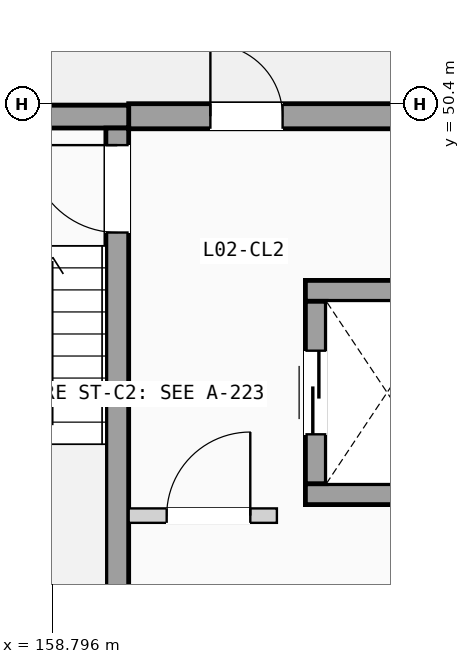
"""IFC4 building model, lengths in metres.
Left out: names, types, materials, properties, quantities, classifications, styles, units other than length and angle.
Written with IfcOpenShell. Run it as: python <this file> out.ifc"""

import sys

from ifc_helpers import new_model, si_unit, direction, frame, frame_2d, origin, place, context, subcontext, project, spatial, rectangle, extrude, element, fill, save


model = new_model("IFC4")
c1 = context("Model", 3, precision=1e-05, world=origin(), true_north=direction((0.0, 1.0)))
c2 = subcontext(c1, "Body", "Model", "MODEL_VIEW")
j1 = project(units=[si_unit("LENGTHUNIT", "METRE"), si_unit("PLANEANGLEUNIT", "RADIAN")], contexts=[c1])
p1 = place(None, origin())
s1 = spatial("IfcSite", under=j1, at=p1, CompositionType="ELEMENT")
p2 = place(p1, origin())
s2 = spatial("IfcBuilding", under=s1, at=p2, CompositionType="ELEMENT")
p3 = place(p2, frame((0.0, 0.0, 8.575)))
s3 = spatial("IfcBuildingStorey", under=s2, at=p3, CompositionType="ELEMENT", Elevation=8.575)
p4 = place(p3, frame((159.8, 50.235, 0.0), z_axis=(0.0, 0.0, 1.0), x_axis=(1.0, 0.0, 0.0)))
e1 = element("IfcWall", 1, at=p4, inside=s3, PredefinedType="SOLIDWALL", context=c2, shape_type="SweptSolid", body=[
    extrude(rectangle(XDim=4.1, YDim=0.33, at=frame_2d((2.05, 0.0))), origin(), (0.0, 0.0, 1.0), 3.24),
])
p5 = place(p4, frame((1.075, 0.0, 0.0)))
e2 = element("IfcOpeningElement", 2, at=p5, cuts=e1, PredefinedType="OPENING", context=c2, shape_type="SweptSolid", body=[
    extrude(rectangle(XDim=0.95, YDim=2.15, at=frame_2d((0.475, 1.075))), frame((0.0, 0.175, 0.0), z_axis=(0.0, -1.0, 0.0), x_axis=(1.0, 0.0, 0.0)), (0.0, 0.0, 1.0), 0.35),
])
p6 = place(p3, frame((156.2, 50.23, 0.0), z_axis=(0.0, 0.0, 1.0), x_axis=(1.0, 0.0, 0.0)))
e3 = element("IfcWall", 3, at=p6, inside=s3, PredefinedType="SHEAR", context=c2, shape_type="SweptSolid", body=[
    extrude(rectangle(XDim=3.6, YDim=0.3, at=frame_2d((1.8, 0.0))), origin(), (0.0, 0.0, 1.0), 3.24),
])
p7 = place(p3, frame((159.65, 43.08, 0.0), z_axis=(0.0, 0.0, 1.0), x_axis=(0.0, 1.0, 0.0)))
e4 = element("IfcWall", 4, at=p7, inside=s3, PredefinedType="SHEAR", context=c2, shape_type="SweptSolid", body=[
    extrude(rectangle(XDim=7.0, YDim=0.3, at=frame_2d((3.5, 0.0))), origin(), (0.0, 0.0, 1.0), 3.24),
])
p8 = place(p7, frame((5.625, 0.0, 0.0)))
e5 = element("IfcOpeningElement", 5, at=p8, cuts=e4, PredefinedType="OPENING", context=c2, shape_type="SweptSolid", body=[
    extrude(rectangle(XDim=1.15, YDim=2.12, at=frame_2d((0.575, 1.06))), frame((0.0, 0.16, 0.0), z_axis=(0.0, -1.0, 0.0), x_axis=(1.0, 0.0, 0.0)), (0.0, 0.0, 1.0), 0.32),
])
for number, where, z_axis, x_axis in (
    (6, (162.125, 45.262, 0.0), (0.0, 0.0, 1.0), (1.0, 0.0, 0.0)),
    (7, (162.125, 47.938, 0.0), (0.0, 0.0, 1.0), (1.0, 0.0, 0.0)),
):
    element("IfcWall", number, at=place(p3, frame(where, z_axis=z_axis, x_axis=x_axis)), inside=s3, PredefinedType="SHEAR", context=c2, shape_type="SweptSolid", body=[
        extrude(rectangle(XDim=2.15, YDim=0.275, at=frame_2d((1.075, 0.0))), origin(), (0.0, 0.0, 1.0), 3.24),
    ])
p9 = place(p3, frame((162.262, 45.4, 0.0), z_axis=(0.0, 0.0, 1.0), x_axis=(0.0, 1.0, 0.0)))
e8 = element("IfcWall", 8, at=p9, inside=s3, PredefinedType="SHEAR", context=c2, shape_type="SweptSolid", body=[
    extrude(rectangle(XDim=2.4, YDim=0.275, at=frame_2d((1.2, 0.0))), origin(), (0.0, 0.0, 1.0), 3.24),
])
p10 = place(p9, frame((0.65, 0.0, 0.0)))
e9 = element("IfcOpeningElement", 9, at=p10, cuts=e8, PredefinedType="OPENING", context=c2, shape_type="SweptSolid", body=[
    extrude(rectangle(XDim=1.1, YDim=2.15, at=frame_2d((0.55, 1.075))), frame((0.0, 0.147, 0.0), z_axis=(0.0, -1.0, 0.0), x_axis=(1.0, 0.0, 0.0)), (0.0, 0.0, 1.0), 0.295),
])
p11 = place(p3, frame((159.8, 44.98, 0.0), z_axis=(0.0, 0.0, 1.0), x_axis=(1.0, 0.0, 0.0)))
e10 = element("IfcWall", 10, at=p11, inside=s3, PredefinedType="PARTITIONING", context=c2, shape_type="SweptSolid", body=[
    extrude(rectangle(XDim=1.95, YDim=0.19, at=frame_2d((0.975, 0.0))), origin(), (0.0, 0.0, 1.0), 3.22),
])
p12 = place(p11, frame((0.5, 0.0, 0.0)))
e11 = element("IfcOpeningElement", 11, at=p12, cuts=e10, PredefinedType="OPENING", context=c2, shape_type="SweptSolid", body=[
    extrude(rectangle(XDim=1.1, YDim=2.12, at=frame_2d((0.55, 1.06))), frame((0.0, 0.105, 0.0), z_axis=(0.0, -1.0, 0.0), x_axis=(1.0, 0.0, 0.0)), (0.0, 0.0, 1.0), 0.21),
])
p13 = place(p5, origin())
e12 = element("IfcDoor", 12, at=p13, inside=s3, OperationType="SINGLE_SWING_LEFT", PredefinedType="DOOR", context=c2, shape_type="SweptSolid", body=[
    extrude(rectangle(XDim=0.95, YDim=2.15, at=frame_2d((0.475, 1.075))), frame((0.0, 0.025, 0.0), z_axis=(0.0, -1.0, 0.0), x_axis=(1.0, 0.0, 0.0)), (0.0, 0.0, 1.0), 0.05),
])
fill(e2, e12)
p14 = place(p8, origin())
e13 = element("IfcDoor", 13, at=p14, inside=s3, OperationType="SINGLE_SWING_RIGHT", PredefinedType="DOOR", context=c2, shape_type="SweptSolid", body=[
    extrude(rectangle(XDim=1.15, YDim=2.12, at=frame_2d((0.575, 1.06))), frame((0.0, 0.025, 0.0), z_axis=(0.0, -1.0, 0.0), x_axis=(1.0, 0.0, 0.0)), (0.0, 0.0, 1.0), 0.05),
])
fill(e5, e13)
p15 = place(p10, origin())
e14 = element("IfcDoor", 14, at=p15, inside=s3, OperationType="SLIDING_TO_LEFT", PredefinedType="DOOR", context=c2, shape_type="SweptSolid", body=[
    extrude(rectangle(XDim=1.1, YDim=2.15, at=frame_2d((0.55, 1.075))), frame((0.0, 0.025, 0.0), z_axis=(0.0, -1.0, 0.0), x_axis=(1.0, 0.0, 0.0)), (0.0, 0.0, 1.0), 0.05),
])
fill(e9, e14)
p16 = place(p12, origin())
e15 = element("IfcDoor", 15, at=p16, inside=s3, OperationType="SINGLE_SWING_RIGHT", PredefinedType="DOOR", context=c2, shape_type="SweptSolid", body=[
    extrude(rectangle(XDim=1.1, YDim=2.12, at=frame_2d((0.55, 1.06))), frame((0.0, 0.025, 0.0), z_axis=(0.0, -1.0, 0.0), x_axis=(1.0, 0.0, 0.0)), (0.0, 0.0, 1.0), 0.05),
])
fill(e11, e15)
save(model, sys.argv[1])
